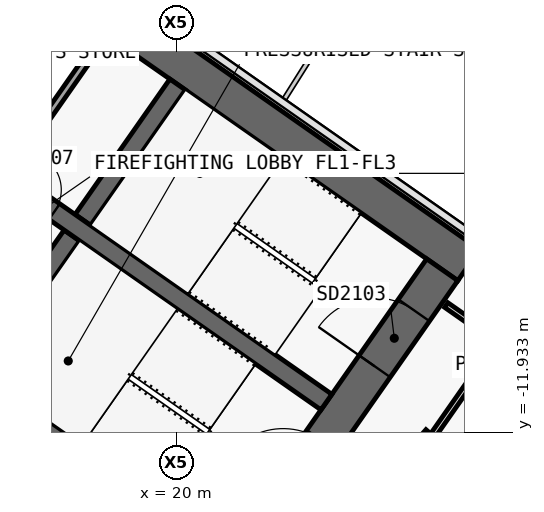
"""IFC4 building model, lengths in metres.
Left out: names, types, materials, properties, quantities, classifications, styles, units other than length and angle.
Written with IfcOpenShell. Run it as: python <this file> out.ifc"""

import sys

from ifc_helpers import new_model, si_unit, direction, frame, frame_2d, origin, place, context, subcontext, project, spatial, polyline, rectangle, outline, extrude, element, fill, save


model = new_model("IFC4")
c1 = context("Model", 3, precision=1e-05, world=origin(), true_north=direction((0.0, 1.0)))
c2 = subcontext(c1, "Body", "Model", "MODEL_VIEW")
j1 = project(units=[si_unit("LENGTHUNIT", "METRE"), si_unit("PLANEANGLEUNIT", "RADIAN")], contexts=[c1])
p1 = place(None, origin())
s1 = spatial("IfcSite", under=j1, at=p1, CompositionType="ELEMENT")
p2 = place(p1, origin())
s2 = spatial("IfcBuilding", under=s1, at=p2, CompositionType="ELEMENT")
p3 = place(p2, frame((0.0, 0.0, 122.9)))
s3 = spatial("IfcBuildingStorey", under=s2, at=p3, CompositionType="ELEMENT", Elevation=122.9)
p4 = place(p3, frame((-0.037, 11.867, 0.0), z_axis=(0.0, 0.0, 1.0), x_axis=(0.819155306259, -0.573571777746, 0.0)))
e1 = element("IfcWall", 1, at=p4, inside=s3, PredefinedType="SHEAR", context=c2, shape_type="SweptSolid", body=[
    extrude(outline(polyline([(33.837, 0.5), (0.0, 0.5), (0.7, -0.5), (33.837, -0.5), (33.837, 0.5)])), origin(), (0.0, 0.0, 1.0), 3.6),
])
p5 = place(p3, frame((-0.037, -0.585, 0.0), z_axis=(0.0, 0.0, 1.0), x_axis=(0.819157152511, -0.573569140985, 0.0)))
e2 = element("IfcWall", 2, at=p5, inside=s3, PredefinedType="SHEAR", context=c2, shape_type="SweptSolid", body=[
    extrude(outline(polyline([(26.695, 0.5), (0.0, 0.5), (0.7, -0.5), (26.695, -0.5), (26.695, 0.5)])), origin(), (0.0, 0.0, 1.0), 3.6),
])
p6 = place(p5, frame((1.245, 0.0, 0.0)))
e3 = element("IfcOpeningElement", 3, at=p6, cuts=e2, PredefinedType="OPENING", context=c2, shape_type="SweptSolid", body=[
    extrude(rectangle(XDim=1.5, YDim=2.1, at=frame_2d((0.75, 1.05))), frame((0.0, 0.51, 0.0), z_axis=(0.0, -1.0, 0.0), x_axis=(1.0, 0.0, 0.0)), (0.0, 0.0, 1.0), 1.02),
])
p7 = place(p5, frame((12.445, 0.0, 0.0)))
e4 = element("IfcOpeningElement", 4, at=p7, cuts=e2, PredefinedType="OPENING", context=c2, shape_type="SweptSolid", body=[
    extrude(rectangle(XDim=1.5, YDim=2.1, at=frame_2d((0.75, 1.05))), frame((0.0, 0.51, 0.0), z_axis=(0.0, -1.0, 0.0), x_axis=(1.0, 0.0, 0.0)), (0.0, 0.0, 1.0), 1.02),
])
p8 = place(p3, frame((21.708, -15.2, 0.0), z_axis=(0.0, 0.0, 1.0), x_axis=(0.573576324356, 0.819152122709, 0.0)))
e5 = element("IfcWall", 5, at=p8, inside=s3, PredefinedType="SHEAR", context=c2, shape_type="SweptSolid", body=[
    extrude(outline(polyline([(9.2, 0.5), (0.0, 0.5), (0.0, -0.5), (9.2, -0.5), (9.2, 0.5)])), origin(), (0.0, 0.0, 1.0), 3.6),
])
p9 = place(p8, frame((6.1, 0.0, 0.0)))
e6 = element("IfcOpeningElement", 6, at=p9, cuts=e5, PredefinedType="OPENING", context=c2, shape_type="SweptSolid", body=[
    extrude(rectangle(XDim=1.8, YDim=2.1, at=frame_2d((0.9, 1.05))), frame((0.0, 0.51, 0.0), z_axis=(0.0, -1.0, 0.0), x_axis=(1.0, 0.0, 0.0)), (0.0, 0.0, 1.0), 1.02),
])
p10 = place(p8, frame((1.9, 0.0, 0.0)))
e7 = element("IfcOpeningElement", 7, at=p10, cuts=e5, PredefinedType="OPENING", context=c2, shape_type="SweptSolid", body=[
    extrude(rectangle(XDim=1.8, YDim=2.1, at=frame_2d((0.9, 1.05))), frame((0.0, 0.51, 0.0), z_axis=(0.0, -1.0, 0.0), x_axis=(1.0, 0.0, 0.0)), (0.0, 0.0, 1.0), 1.02),
])
p11 = place(p3, frame((14.745, -10.324, 0.0), z_axis=(0.0, 0.0, 1.0), x_axis=(0.57356780395, 0.819158088694, 0.0)))
e8 = element("IfcWall", 8, at=p11, inside=s3, PredefinedType="SHEAR", context=c2, shape_type="SweptSolid", body=[
    extrude(outline(polyline([(0.0, 0.25), (0.0, -0.25), (4.35, -0.25), (4.35, 0.25), (0.0, 0.25)])), origin(), (0.0, 0.0, 1.0), 3.6),
])
p12 = place(p3, frame((17.527, -6.352, 0.0), z_axis=(0.0, 0.0, 1.0), x_axis=(0.573530143085, 0.819184457233, 0.0)))
e9 = element("IfcWall", 9, at=p12, inside=s3, PredefinedType="SHEAR", context=c2, shape_type="SweptSolid", body=[
    extrude(outline(polyline([(4.35, -0.25), (4.35, 0.25), (0.0, 0.25), (0.0, -0.25), (4.35, -0.25)])), origin(), (0.0, 0.0, 1.0), 3.6),
])
p13 = place(p3, frame((2.638, 3.768, 0.0), z_axis=(0.0, 0.0, 1.0), x_axis=(0.819148977158, -0.573580816643, 0.0)))
e10 = element("IfcWall", 10, at=p13, inside=s3, PredefinedType="SHEAR", context=c2, shape_type="SweptSolid", body=[
    extrude(outline(polyline([(0.0, 0.25), (0.0, -0.25), (26.0, -0.25), (26.0, 0.25), (0.0, 0.25)])), origin(), (0.0, 0.0, 1.0), 3.6),
])
p14 = place(p13, frame((9.637, 0.0, 0.0)))
e11 = element("IfcOpeningElement", 11, at=p14, cuts=e10, PredefinedType="OPENING", context=c2, shape_type="SweptSolid", body=[
    extrude(rectangle(XDim=1.2, YDim=2.1, at=frame_2d((0.6, 1.05))), frame((0.0, 0.26, 0.0), z_axis=(0.0, -1.0, 0.0), x_axis=(1.0, 0.0, 0.0)), (0.0, 0.0, 1.0), 0.52),
])
p15 = place(p13, frame((11.812, 0.0, 0.0)))
e12 = element("IfcOpeningElement", 12, at=p15, cuts=e10, PredefinedType="OPENING", context=c2, shape_type="SweptSolid", body=[
    extrude(rectangle(XDim=1.2, YDim=2.1, at=frame_2d((0.6, 1.05))), frame((0.0, 0.26, 0.0), z_axis=(0.0, -1.0, 0.0), x_axis=(1.0, 0.0, 0.0)), (0.0, 0.0, 1.0), 0.52),
])
p16 = place(p13, frame((13.988, 0.0, 0.0)))
e13 = element("IfcOpeningElement", 13, at=p16, cuts=e10, PredefinedType="OPENING", context=c2, shape_type="SweptSolid", body=[
    extrude(rectangle(XDim=1.2, YDim=2.1, at=frame_2d((0.6, 1.05))), frame((0.0, 0.26, 0.0), z_axis=(0.0, -1.0, 0.0), x_axis=(1.0, 0.0, 0.0)), (0.0, 0.0, 1.0), 0.52),
])
p17 = place(p13, frame((16.262, 0.0, 0.0)))
e14 = element("IfcOpeningElement", 14, at=p17, cuts=e10, PredefinedType="OPENING", context=c2, shape_type="SweptSolid", body=[
    extrude(rectangle(XDim=1.0, YDim=2.1, at=frame_2d((0.5, 1.05))), frame((0.0, 0.26, 0.0), z_axis=(0.0, -1.0, 0.0), x_axis=(1.0, 0.0, 0.0)), (0.0, 0.0, 1.0), 0.52),
])
p18 = place(p3, frame((15.622, -5.018, 0.0), z_axis=(0.0, 0.0, 1.0), x_axis=(0.573594173421, 0.819139624372, 0.0)))
e15 = element("IfcWall", 15, at=p18, inside=s3, PredefinedType="SOLIDWALL", context=c2, shape_type="SweptSolid", body=[
    extrude(rectangle(XDim=4.35, YDim=0.2, at=frame_2d((2.175, 0.0))), origin(), (0.0, 0.0, 1.0), 3.6),
])
p19 = place(p3, frame((22.285, -16.825, 0.0), z_axis=(0.0, 0.0, 1.0), x_axis=(0.661551268245, 0.749899939647, 0.0)))
e16 = element("IfcWall", 16, at=p19, inside=s3, PredefinedType="PARTITIONING", context=c2, shape_type="SweptSolid", body=[
    extrude(rectangle(XDim=6.541, YDim=0.15, at=frame_2d((3.271, 0.0))), origin(), (0.0, 0.0, 1.0), 2.6),
])
p20 = place(p3, frame((26.746, -12.014, 0.0), z_axis=(0.0, 0.0, 1.0), x_axis=(0.573560650686, 0.819163097304, 0.0)))
e17 = element("IfcWall", 17, at=p20, inside=s3, PredefinedType="PARTITIONING", context=c2, shape_type="SweptSolid", body=[
    extrude(rectangle(XDim=3.0, YDim=0.15, at=frame_2d((1.5, 0.0))), origin(), (0.0, 0.0, 1.0), 3.32),
])
p21 = place(p3, frame((28.467, -9.556, 0.0), z_axis=(0.0, 0.0, 1.0), x_axis=(-0.819109000826, 0.573637903879, 0.0)))
e18 = element("IfcWall", 18, at=p21, inside=s3, PredefinedType="PARTITIONING", context=c2, shape_type="SweptSolid", body=[
    extrude(rectangle(XDim=1.68, YDim=0.15, at=frame_2d((0.84, 0.0))), origin(), (0.0, 0.0, 1.0), 3.32),
])
p22 = place(p17, origin())
e19 = element("IfcDoor", 19, at=p22, inside=s3, OperationType="SINGLE_SWING_RIGHT", PredefinedType="DOOR", context=c2, shape_type="SweptSolid", body=[
    extrude(rectangle(XDim=1.0, YDim=2.1, at=frame_2d((0.5, 1.05))), frame((0.0, 0.025, 0.0), z_axis=(0.0, -1.0, 0.0), x_axis=(1.0, 0.0, 0.0)), (0.0, 0.0, 1.0), 0.05),
])
fill(e14, e19)
p23 = place(p9, origin())
e20 = element("IfcDoor", 20, at=p23, inside=s3, OperationType="DOUBLE_DOOR_SINGLE_SWING", PredefinedType="DOOR", context=c2, shape_type="SweptSolid", body=[
    extrude(rectangle(XDim=1.8, YDim=2.1, at=frame_2d((0.9, 1.05))), frame((0.0, 0.025, 0.0), z_axis=(0.0, -1.0, 0.0), x_axis=(1.0, 0.0, 0.0)), (0.0, 0.0, 1.0), 0.05),
])
fill(e6, e20)
save(model, sys.argv[1])
